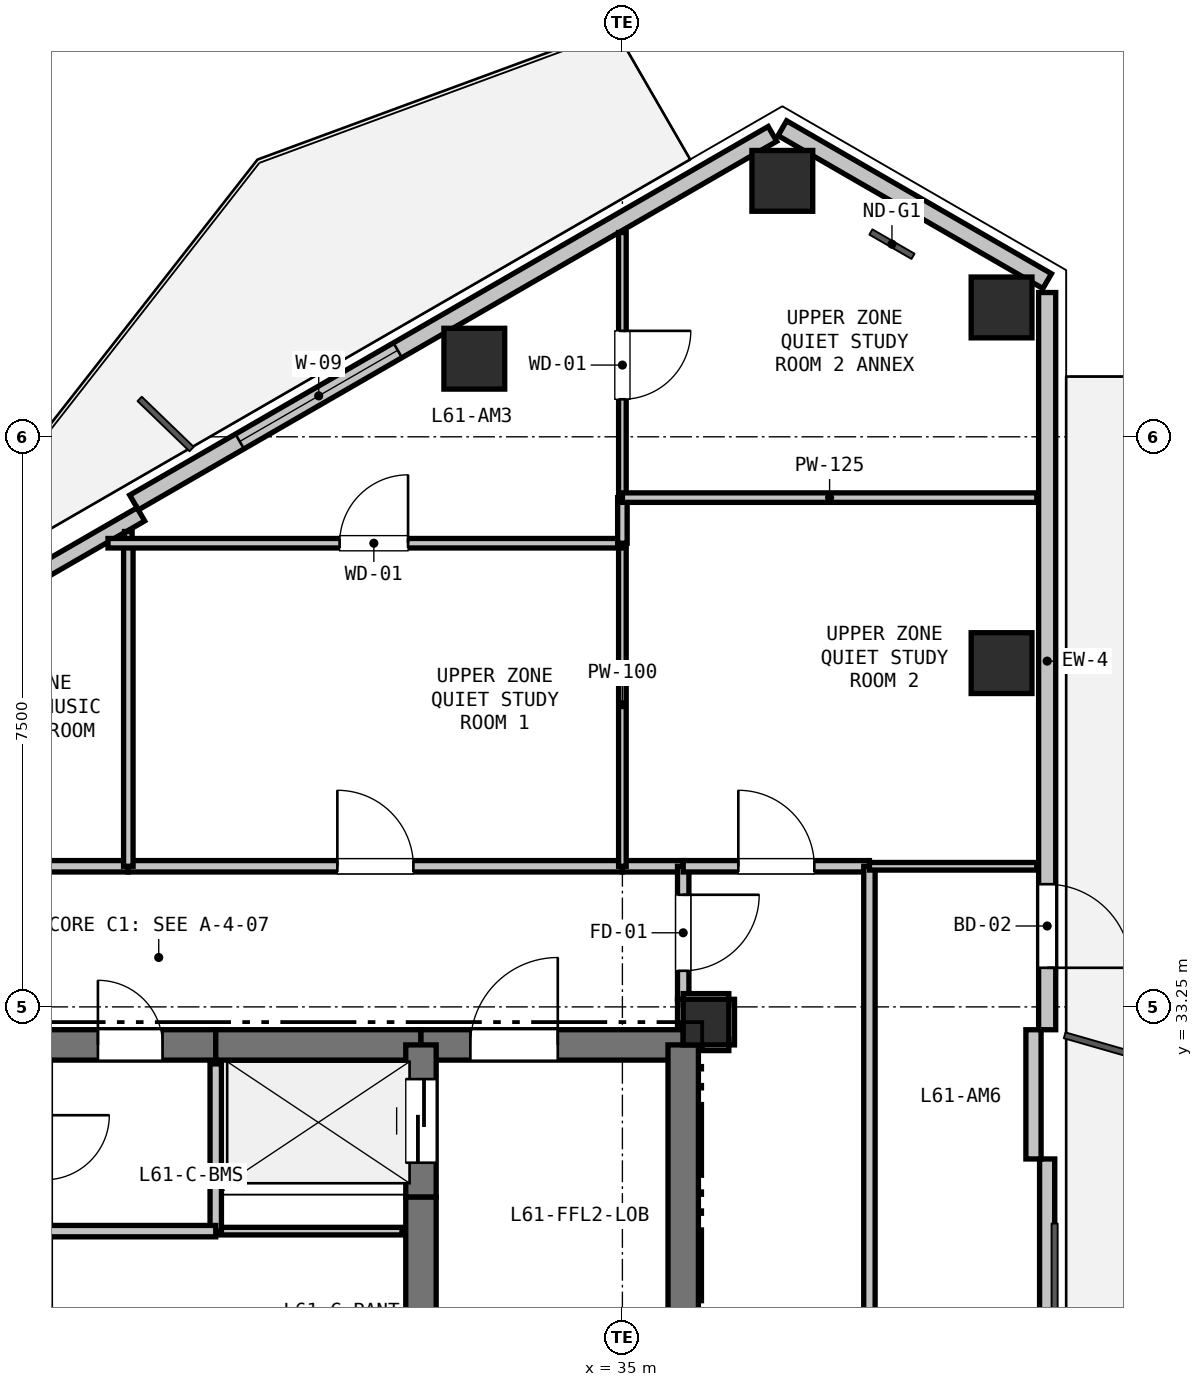
"""IFC4 building model, lengths in metres.
Left out: names, types, materials, properties, quantities, classifications, styles, units other than length and angle.
Written with IfcOpenShell. Run it as: python <this file> out.ifc"""

import sys

from ifc_helpers import new_model, si_unit, direction, frame, frame_2d, origin, origin_2d, place, context, subcontext, project, spatial, rectangle, hollow_rectangle, extrude, element, fill, save


model = new_model("IFC4")
c1 = context("Model", 3, precision=1e-05, world=origin(), true_north=direction((0.0, 1.0)))
c2 = subcontext(c1, "Body", "Model", "MODEL_VIEW")
j1 = project(units=[si_unit("LENGTHUNIT", "METRE"), si_unit("PLANEANGLEUNIT", "RADIAN")], contexts=[c1])
p1 = place(None, origin())
s1 = spatial("IfcSite", under=j1, at=p1, CompositionType="ELEMENT")
p2 = place(p1, origin())
s2 = spatial("IfcBuilding", under=s1, at=p2, CompositionType="ELEMENT")
p3 = place(p2, frame((0.0, 0.0, 218.4)))
s3 = spatial("IfcBuildingStorey", under=s2, at=p3, CompositionType="ELEMENT", Elevation=218.4)
p4 = place(p3, frame((36.1, 33.05, 0.0), z_axis=(0.0, 0.0, 1.0), x_axis=(1.0, 0.0, 0.0)))
e1 = element("IfcColumn", 1, at=p4, inside=s3, PredefinedType="COLUMN", context=c2, shape_type="SweptSolid", body=[
    extrude(rectangle(XDim=0.6, YDim=0.6, at=origin_2d()), origin(), (0.0, 0.0, 1.0), 4.8),
])
for number, where, z_axis, x_axis in (
    (2, (33.052, 41.778, 0.0), (0.0, 0.0, 1.0), (1.0, 0.0, 0.0)),
    (3, (37.104, 44.117, 0.0), (0.0, 0.0, 1.0), (1.0, 0.0, 0.0)),
    (4, (39.988, 42.452, 0.0), (0.0, 0.0, 1.0), (1.0, 0.0, 0.0)),
    (5, (39.988, 37.773, 0.0), (0.0, 0.0, 1.0), (1.0, 0.0, 0.0)),
):
    element("IfcColumn", number, at=place(p3, frame(where, z_axis=z_axis, x_axis=x_axis)), inside=s3, PredefinedType="COLUMN", context=c2, shape_type="SweptSolid", body=[
        extrude(hollow_rectangle(XDim=0.8, YDim=0.8, WallThickness=0.025, at=origin_2d()), origin(), (0.0, 0.0, 1.0), 3.23),
    ])
p5 = place(p3, frame((37.104, 44.81, 0.0), z_axis=(0.0, 0.0, 1.0), x_axis=(0.866023907196, -0.500002592159, 0.0)))
e6 = element("IfcWall", 6, at=p5, inside=s3, PredefinedType="SOLIDWALL", context=c2, shape_type="SweptSolid", body=[
    extrude(rectangle(XDim=4.023, YDim=0.225, at=frame_2d((2.012, 0.0))), origin(), (0.0, 0.0, 1.0), 4.2),
])
p6 = place(p3, frame((28.575, 39.885, 0.0), z_axis=(0.0, 0.0, 1.0), x_axis=(0.866016233231, 0.500015883528, 0.0)))
e7 = element("IfcWall", 7, at=p6, inside=s3, PredefinedType="SOLIDWALL", context=c2, shape_type="SweptSolid", body=[
    extrude(rectangle(XDim=9.699, YDim=0.225, at=frame_2d((4.85, 0.0))), origin(), (0.0, 0.0, 1.0), 3.215),
])
p7 = place(p6, frame((1.606, 0.0, 0.9)))
e8 = element("IfcOpeningElement", 8, at=p7, cuts=e7, PredefinedType="OPENING", context=c2, shape_type="SweptSolid", body=[
    extrude(rectangle(XDim=2.4, YDim=2.2, at=frame_2d((1.2, 1.1))), frame((0.0, 0.123, 0.0), z_axis=(0.0, -1.0, 0.0), x_axis=(1.0, 0.0, 0.0)), (0.0, 0.0, 1.0), 0.245),
])
p8 = place(p3, frame((27.192, 38.88, 0.0), z_axis=(0.0, 0.0, 1.0), x_axis=(0.866025371046, 0.500000056704, 0.0)))
e9 = element("IfcWall", 9, at=p8, inside=s3, PredefinedType="PARAPET", context=c2, shape_type="SweptSolid", body=[
    extrude(rectangle(XDim=1.7, YDim=0.2, at=frame_2d((0.85, 0.0))), origin(), (0.0, 0.0, 1.0), 4.2),
])
p9 = place(p3, frame((40.588, 42.648, 0.0), z_axis=(0.0, 0.0, 1.0), x_axis=(0.0, -1.0, 0.0)))
e10 = element("IfcWall", 10, at=p9, inside=s3, PredefinedType="SOLIDWALL", context=c2, shape_type="SweptSolid", body=[
    extrude(rectangle(XDim=9.699, YDim=0.225, at=frame_2d((4.85, 0.0))), origin(), (0.0, 0.0, 1.0), 3.215),
])
p10 = place(p9, frame((7.784, 0.0, 0.0)))
e11 = element("IfcOpeningElement", 11, at=p10, cuts=e10, PredefinedType="OPENING", context=c2, shape_type="SweptSolid", body=[
    extrude(rectangle(XDim=1.1, YDim=2.1, at=frame_2d((0.55, 1.05))), frame((0.0, 0.123, 0.0), z_axis=(0.0, -1.0, 0.0), x_axis=(1.0, 0.0, 0.0)), (0.0, 0.0, 1.0), 0.245),
])
p11 = place(p3, frame((40.588, 31.25, 0.0), z_axis=(0.0, 0.0, 1.0), x_axis=(0.0, -1.0, 0.0)))
e12 = element("IfcWall", 12, at=p11, inside=s3, PredefinedType="PARAPET", context=c2, shape_type="SweptSolid", body=[
    extrude(rectangle(XDim=8.999, YDim=0.2, at=frame_2d((4.5, 0.0))), origin(), (0.0, 0.0, 1.0), 0.2),
])
p12 = place(p3, frame((40.408, 32.949, 0.0), z_axis=(0.0, 0.0, 1.0), x_axis=(0.0, -1.0, 0.0)))
e13 = element("IfcWall", 13, at=p12, inside=s3, PredefinedType="PARAPET", context=c2, shape_type="SweptSolid", body=[
    extrude(rectangle(XDim=1.7, YDim=0.2, at=frame_2d((0.85, 0.0))), origin(), (0.0, 0.0, 1.0), 4.2),
])
p13 = place(p3, frame((27.4, 32.75, 0.0), z_axis=(0.0, 0.0, 1.0), x_axis=(1.0, 0.0, 0.0)))
e14 = element("IfcWall", 14, at=p13, inside=s3, PredefinedType="SHEAR", context=c2, shape_type="SweptSolid", body=[
    extrude(rectangle(XDim=2.25, YDim=0.4, at=frame_2d((1.125, 0.0))), origin(), (0.0, 0.0, 1.0), 4.58),
])
p14 = place(p13, frame((0.7, 0.0, 0.0)))
e15 = element("IfcOpeningElement", 15, at=p14, cuts=e14, PredefinedType="OPENING", context=c2, shape_type="SweptSolid", body=[
    extrude(rectangle(XDim=0.85, YDim=2.1, at=frame_2d((0.425, 1.05))), frame((0.0, 0.21, 0.0), z_axis=(0.0, -1.0, 0.0), x_axis=(1.0, 0.0, 0.0)), (0.0, 0.0, 1.0), 0.42),
])
p15 = place(p3, frame((29.65, 32.75, 0.0), z_axis=(0.0, 0.0, 1.0), x_axis=(1.0, 0.0, 0.0)))
e16 = element("IfcWall", 16, at=p15, inside=s3, PredefinedType="SHEAR", context=c2, shape_type="SweptSolid", body=[
    extrude(rectangle(XDim=2.7, YDim=0.4, at=frame_2d((1.35, 0.0))), origin(), (0.0, 0.0, 1.0), 4.58),
])
p16 = place(p3, frame((32.35, 32.75, 0.0), z_axis=(0.0, 0.0, 1.0), x_axis=(1.0, 0.0, 0.0)))
e17 = element("IfcWall", 17, at=p16, inside=s3, PredefinedType="SHEAR", context=c2, shape_type="SweptSolid", body=[
    extrude(rectangle(XDim=3.45, YDim=0.4, at=frame_2d((1.725, 0.0))), origin(), (0.0, 0.0, 1.0), 4.58),
])
p17 = place(p16, frame((0.65, 0.0, 0.0)))
e18 = element("IfcOpeningElement", 18, at=p17, cuts=e17, PredefinedType="OPENING", context=c2, shape_type="SweptSolid", body=[
    extrude(rectangle(XDim=1.15, YDim=2.15, at=frame_2d((0.575, 1.075))), frame((0.0, 0.21, 0.0), z_axis=(0.0, -1.0, 0.0), x_axis=(1.0, 0.0, 0.0)), (0.0, 0.0, 1.0), 0.42),
])
p18 = place(p3, frame((35.8, 32.75, 0.0), z_axis=(0.0, 0.0, 1.0), x_axis=(0.0, -1.0, 0.0)))
e19 = element("IfcWall", 19, at=p18, inside=s3, PredefinedType="SHEAR", context=c2, shape_type="SweptSolid", body=[
    extrude(rectangle(XDim=4.65, YDim=0.4, at=frame_2d((2.325, 0.0))), origin(), (0.0, 0.0, 1.0), 4.58),
])
p19 = place(p3, frame((32.35, 27.95, 0.0), z_axis=(0.0, 0.0, 1.0), x_axis=(0.0, 1.0, 0.0)))
e20 = element("IfcWall", 20, at=p19, inside=s3, PredefinedType="SHEAR", context=c2, shape_type="SweptSolid", body=[
    extrude(rectangle(XDim=2.8, YDim=0.4, at=frame_2d((1.4, 0.0))), origin(), (0.0, 0.0, 1.0), 4.58),
])
p20 = place(p3, frame((32.35, 30.75, 0.0), z_axis=(0.0, 0.0, 1.0), x_axis=(0.0, 1.0, 0.0)))
e21 = element("IfcWall", 21, at=p20, inside=s3, PredefinedType="SHEAR", context=c2, shape_type="SweptSolid", body=[
    extrude(rectangle(XDim=2.0, YDim=0.4, at=frame_2d((1.0, 0.0))), origin(), (0.0, 0.0, 1.0), 4.58),
])
p21 = place(p20, frame((0.45, 0.0, 0.0)))
e22 = element("IfcOpeningElement", 22, at=p21, cuts=e21, PredefinedType="OPENING", context=c2, shape_type="SweptSolid", body=[
    extrude(rectangle(XDim=1.1, YDim=2.15, at=frame_2d((0.55, 1.075))), frame((0.0, 0.21, 0.0), z_axis=(0.0, -1.0, 0.0), x_axis=(1.0, 0.0, 0.0)), (0.0, 0.0, 1.0), 0.42),
])
p22 = place(p3, frame((32.1, 30.3, 0.0), z_axis=(0.0, 0.0, 1.0), x_axis=(-1.0, 0.0, 0.0)))
e23 = element("IfcWall", 23, at=p22, inside=s3, PredefinedType="PARTITIONING", context=c2, shape_type="SweptSolid", body=[
    extrude(rectangle(XDim=2.45, YDim=0.1, at=frame_2d((1.225, 0.0))), origin(), (0.0, 0.0, 1.0), 4.58),
])
p23 = place(p3, frame((29.65, 30.3, 0.0), z_axis=(0.0, 0.0, 1.0), x_axis=(0.0, 1.0, 0.0)))
e24 = element("IfcWall", 24, at=p23, inside=s3, PredefinedType="PARTITIONING", context=c2, shape_type="SweptSolid", body=[
    extrude(rectangle(XDim=2.2, YDim=0.15, at=frame_2d((1.1, 0.0))), origin(), (0.0, 0.0, 1.0), 4.58),
])
p24 = place(p3, frame((20.362, 35.1, 0.0), z_axis=(0.0, 0.0, 1.0), x_axis=(1.0, 0.0, 0.0)))
e25 = element("IfcWall", 25, at=p24, inside=s3, PredefinedType="PARTITIONING", context=c2, shape_type="SweptSolid", body=[
    extrude(rectangle(XDim=8.138, YDim=0.15, at=frame_2d((4.069, 0.0))), origin(), (0.0, 0.0, 1.0), 2.365),
])
p25 = place(p24, frame((3.169, 0.0, 0.0)))
e26 = element("IfcOpeningElement", 26, at=p25, cuts=e25, PredefinedType="OPENING", context=c2, shape_type="SweptSolid", body=[
    extrude(rectangle(XDim=1.8, YDim=2.2, at=frame_2d((0.9, 1.1))), frame((0.0, 0.085, 0.0), z_axis=(0.0, -1.0, 0.0), x_axis=(1.0, 0.0, 0.0)), (0.0, 0.0, 1.0), 0.17),
])
p26 = place(p3, frame((28.5, 35.1, 0.0), z_axis=(0.0, 0.0, 1.0), x_axis=(1.0, 0.0, 0.0)))
e27 = element("IfcWall", 27, at=p26, inside=s3, PredefinedType="PARTITIONING", context=c2, shape_type="SweptSolid", body=[
    extrude(rectangle(XDim=6.5, YDim=0.15, at=frame_2d((3.25, 0.0))), origin(), (0.0, 0.0, 1.0), 3.215),
])
p27 = place(p26, frame((2.75, 0.0, 0.0)))
e28 = element("IfcOpeningElement", 28, at=p27, cuts=e27, PredefinedType="OPENING", context=c2, shape_type="SweptSolid", body=[
    extrude(rectangle(XDim=1.0, YDim=2.15, at=frame_2d((0.5, 1.075))), frame((0.0, 0.085, 0.0), z_axis=(0.0, -1.0, 0.0), x_axis=(1.0, 0.0, 0.0)), (0.0, 0.0, 1.0), 0.17),
])
p28 = place(p3, frame((35.0, 35.1, 0.0), z_axis=(0.0, 0.0, 1.0), x_axis=(1.0, 0.0, 0.0)))
e29 = element("IfcWall", 29, at=p28, inside=s3, PredefinedType="PARTITIONING", context=c2, shape_type="SweptSolid", body=[
    extrude(rectangle(XDim=0.8, YDim=0.15, at=frame_2d((0.4, 0.0))), origin(), (0.0, 0.0, 1.0), 3.215),
])
p29 = place(p3, frame((35.8, 35.1, 0.0), z_axis=(0.0, 0.0, 1.0), x_axis=(0.0, -1.0, 0.0)))
e30 = element("IfcWall", 30, at=p29, inside=s3, PredefinedType="PARTITIONING", context=c2, shape_type="SweptSolid", body=[
    extrude(rectangle(XDim=1.75, YDim=0.15, at=frame_2d((0.875, 0.0))), origin(), (0.0, 0.0, 1.0), 3.215),
])
p30 = place(p29, frame((0.375, 0.0, 0.0)))
e31 = element("IfcOpeningElement", 31, at=p30, cuts=e30, PredefinedType="OPENING", context=c2, shape_type="SweptSolid", body=[
    extrude(rectangle(XDim=1.0, YDim=2.15, at=frame_2d((0.5, 1.075))), frame((0.0, 0.085, 0.0), z_axis=(0.0, -1.0, 0.0), x_axis=(1.0, 0.0, 0.0)), (0.0, 0.0, 1.0), 0.17),
])
p31 = place(p3, frame((35.8, 33.35, 0.0), z_axis=(0.0, 0.0, 1.0), x_axis=(0.0, -1.0, 0.0)))
e32 = element("IfcWall", 32, at=p31, inside=s3, PredefinedType="PARTITIONING", context=c2, shape_type="SweptSolid", body=[
    extrude(rectangle(XDim=0.35, YDim=0.15, at=frame_2d((0.175, 0.0))), origin(), (0.0, 0.0, 1.0), 3.215),
])
p32 = place(p3, frame((36.4, 32.75, 0.0), z_axis=(0.0, 0.0, 1.0), x_axis=(0.0, 1.0, 0.0)))
e33 = element("IfcWall", 33, at=p32, inside=s3, PredefinedType="PARTITIONING", context=c2, shape_type="SweptSolid", body=[
    extrude(rectangle(XDim=0.6, YDim=0.15, at=frame_2d((0.3, 0.0))), origin(), (0.0, 0.0, 1.0), 3.215),
])
p33 = place(p3, frame((36.4, 33.35, 0.0), z_axis=(0.0, 0.0, 1.0), x_axis=(-1.0, 0.0, 0.0)))
e34 = element("IfcWall", 34, at=p33, inside=s3, PredefinedType="PARTITIONING", context=c2, shape_type="SweptSolid", body=[
    extrude(rectangle(XDim=0.6, YDim=0.15, at=frame_2d((0.3, 0.0))), origin(), (0.0, 0.0, 1.0), 3.215),
])
p34 = place(p3, frame((35.8, 35.1, 0.0), z_axis=(0.0, 0.0, 1.0), x_axis=(1.0, 0.0, 0.0)))
e35 = element("IfcWall", 35, at=p34, inside=s3, PredefinedType="PARTITIONING", context=c2, shape_type="SweptSolid", body=[
    extrude(rectangle(XDim=2.45, YDim=0.15, at=frame_2d((1.225, 0.0))), origin(), (0.0, 0.0, 1.0), 3.215),
])
p35 = place(p34, frame((0.725, 0.0, 0.0)))
e36 = element("IfcOpeningElement", 36, at=p35, cuts=e35, PredefinedType="OPENING", context=c2, shape_type="SweptSolid", body=[
    extrude(rectangle(XDim=1.0, YDim=2.15, at=frame_2d((0.5, 1.075))), frame((0.0, 0.085, 0.0), z_axis=(0.0, -1.0, 0.0), x_axis=(1.0, 0.0, 0.0)), (0.0, 0.0, 1.0), 0.17),
])
p36 = place(p3, frame((38.25, 35.1, 0.0), z_axis=(0.0, 0.0, 1.0), x_axis=(0.0, -1.0, 0.0)))
e37 = element("IfcWall", 37, at=p36, inside=s3, PredefinedType="PARTITIONING", context=c2, shape_type="SweptSolid", body=[
    extrude(rectangle(XDim=16.7, YDim=0.15, at=frame_2d((8.35, 0.0))), origin(), (0.0, 0.0, 1.0), 3.215),
])
p37 = place(p36, frame((7.85, 0.0, 0.0)))
e38 = element("IfcOpeningElement", 38, at=p37, cuts=e37, PredefinedType="OPENING", context=c2, shape_type="SweptSolid", body=[
    extrude(rectangle(XDim=1.0, YDim=2.15, at=frame_2d((0.5, 1.075))), frame((0.0, 0.085, 0.0), z_axis=(0.0, -1.0, 0.0), x_axis=(1.0, 0.0, 0.0)), (0.0, 0.0, 1.0), 0.17),
])
p38 = place(p3, frame((36.05, 32.75, 0.0), z_axis=(0.0, 0.0, 1.0), x_axis=(1.0, 0.0, 0.0)))
e39 = element("IfcWall", 39, at=p38, inside=s3, PredefinedType="PARTITIONING", context=c2, shape_type="SweptSolid", body=[
    extrude(rectangle(XDim=0.35, YDim=0.15, at=frame_2d((0.175, 0.0))), origin(), (0.0, 0.0, 1.0), 4.105),
])
p39 = place(p3, frame((27.4, 30.3, 0.0), z_axis=(0.0, 0.0, 1.0), x_axis=(1.0, 0.0, 0.0)))
e40 = element("IfcWall", 40, at=p39, inside=s3, PredefinedType="PARTITIONING", context=c2, shape_type="SweptSolid", body=[
    extrude(rectangle(XDim=2.25, YDim=0.15, at=frame_2d((1.125, 0.0))), origin(), (0.0, 0.0, 1.0), 4.58),
])
p40 = place(p3, frame((28.5, 39.504, 0.0), z_axis=(0.0, 0.0, 1.0), x_axis=(0.0, -1.0, 0.0)))
e41 = element("IfcWall", 41, at=p40, inside=s3, PredefinedType="PARTITIONING", context=c2, shape_type="SweptSolid", body=[
    extrude(rectangle(XDim=0.154, YDim=0.1, at=frame_2d((0.077, 0.0))), origin(), (0.0, 0.0, 1.0), 4.58),
])
p41 = place(p3, frame((28.5, 39.35, 0.0), z_axis=(0.0, 0.0, 1.0), x_axis=(0.0, -1.0, 0.0)))
e42 = element("IfcWall", 42, at=p41, inside=s3, PredefinedType="PARTITIONING", context=c2, shape_type="SweptSolid", body=[
    extrude(rectangle(XDim=4.25, YDim=0.125, at=frame_2d((2.125, 0.0))), origin(), (0.0, 0.0, 1.0), 2.365),
])
p42 = place(p3, frame((35.0, 39.35, 0.0), z_axis=(0.0, 0.0, 1.0), x_axis=(0.0, -1.0, 0.0)))
e43 = element("IfcWall", 43, at=p42, inside=s3, PredefinedType="PARTITIONING", context=c2, shape_type="SweptSolid", body=[
    extrude(rectangle(XDim=4.25, YDim=0.1, at=frame_2d((2.125, 0.0))), origin(), (0.0, 0.0, 1.0), 3.215),
])
p43 = place(p3, frame((28.232, 39.35, 0.0), z_axis=(0.0, 0.0, 1.0), x_axis=(1.0, 0.0, 0.0)))
e44 = element("IfcWall", 44, at=p43, inside=s3, PredefinedType="PARTITIONING", context=c2, shape_type="SweptSolid", body=[
    extrude(rectangle(XDim=6.768, YDim=0.125, at=frame_2d((3.384, 0.0))), origin(), (0.0, 0.0, 1.0), 2.365),
])
p44 = place(p43, frame((3.048, 0.0, 0.0)))
e45 = element("IfcOpeningElement", 45, at=p44, cuts=e44, PredefinedType="OPENING", context=c2, shape_type="SweptSolid", body=[
    extrude(rectangle(XDim=0.9, YDim=2.1, at=frame_2d((0.45, 1.05))), frame((0.0, 0.073, 0.0), z_axis=(0.0, -1.0, 0.0), x_axis=(1.0, 0.0, 0.0)), (0.0, 0.0, 1.0), 0.145),
])
p45 = place(p3, frame((35.0, 43.438, 0.0), z_axis=(0.0, 0.0, 1.0), x_axis=(0.0, -1.0, 0.0)))
e46 = element("IfcWall", 46, at=p45, inside=s3, PredefinedType="PARTITIONING", context=c2, shape_type="SweptSolid", body=[
    extrude(rectangle(XDim=3.488, YDim=0.1, at=frame_2d((1.744, 0.0))), origin(), (0.0, 0.0, 1.0), 3.215),
])
p46 = place(p45, frame((1.294, 0.0, 0.0)))
e47 = element("IfcOpeningElement", 47, at=p46, cuts=e46, PredefinedType="OPENING", context=c2, shape_type="SweptSolid", body=[
    extrude(rectangle(XDim=0.9, YDim=2.1, at=frame_2d((0.45, 1.05))), frame((0.0, 0.06, 0.0), z_axis=(0.0, -1.0, 0.0), x_axis=(1.0, 0.0, 0.0)), (0.0, 0.0, 1.0), 0.12),
])
p47 = place(p3, frame((35.0, 39.95, 0.0), z_axis=(0.0, 0.0, 1.0), x_axis=(0.0, -1.0, 0.0)))
e48 = element("IfcWall", 48, at=p47, inside=s3, PredefinedType="PARTITIONING", context=c2, shape_type="SweptSolid", body=[
    extrude(rectangle(XDim=0.6, YDim=0.125, at=frame_2d((0.3, 0.0))), origin(), (0.0, 0.0, 1.0), 3.215),
])
p48 = place(p3, frame((40.452, 35.1, 0.0), z_axis=(0.0, 0.0, 1.0), x_axis=(-1.0, 0.0, 0.0)))
e49 = element("IfcWall", 49, at=p48, inside=s3, PredefinedType="PARTITIONING", context=c2, shape_type="SweptSolid", body=[
    extrude(rectangle(XDim=2.202, YDim=0.1, at=frame_2d((1.101, 0.0))), origin(), (0.0, 0.0, 1.0), 2.365),
])
p49 = place(p3, frame((35.0, 39.95, 0.0), z_axis=(0.0, 0.0, 1.0), x_axis=(1.0, 0.0, 0.0)))
e50 = element("IfcWall", 50, at=p49, inside=s3, PredefinedType="PARTITIONING", context=c2, shape_type="SweptSolid", body=[
    extrude(rectangle(XDim=5.452, YDim=0.125, at=frame_2d((2.726, 0.0))), origin(), (0.0, 0.0, 1.0), 3.215),
])
p50 = place(p7, origin())
e51 = element("IfcWindow", 51, at=p50, inside=s3, PartitioningType="SINGLE_PANEL", PredefinedType="WINDOW", context=c2, shape_type="SweptSolid", body=[
    extrude(rectangle(XDim=2.4, YDim=2.2, at=frame_2d((1.2, 1.1))), frame((0.0, 0.03, 0.0), z_axis=(0.0, -1.0, 0.0), x_axis=(1.0, 0.0, 0.0)), (0.0, 0.0, 1.0), 0.06),
])
fill(e8, e51)
p51 = place(p10, origin())
e52 = element("IfcDoor", 52, at=p51, inside=s3, OperationType="SINGLE_SWING_RIGHT", PredefinedType="DOOR", context=c2, shape_type="SweptSolid", body=[
    extrude(rectangle(XDim=1.1, YDim=2.1, at=frame_2d((0.55, 1.05))), frame((0.0, 0.025, 0.0), z_axis=(0.0, -1.0, 0.0), x_axis=(1.0, 0.0, 0.0)), (0.0, 0.0, 1.0), 0.05),
])
fill(e11, e52)
p52 = place(p21, origin())
e53 = element("IfcDoor", 53, at=p52, inside=s3, OperationType="SLIDING_TO_LEFT", PredefinedType="DOOR", context=c2, shape_type="SweptSolid", body=[
    extrude(rectangle(XDim=1.1, YDim=2.15, at=frame_2d((0.55, 1.075))), frame((0.0, 0.025, 0.0), z_axis=(0.0, -1.0, 0.0), x_axis=(1.0, 0.0, 0.0)), (0.0, 0.0, 1.0), 0.05),
])
fill(e22, e53)
p53 = place(p17, origin())
e54 = element("IfcDoor", 54, at=p53, inside=s3, OperationType="SINGLE_SWING_RIGHT", PredefinedType="DOOR", context=c2, shape_type="SweptSolid", body=[
    extrude(rectangle(XDim=1.15, YDim=2.15, at=frame_2d((0.575, 1.075))), frame((0.0, 0.025, 0.0), z_axis=(0.0, -1.0, 0.0), x_axis=(1.0, 0.0, 0.0)), (0.0, 0.0, 1.0), 0.05),
])
fill(e18, e54)
p54 = place(p30, origin())
e55 = element("IfcDoor", 55, at=p54, inside=s3, OperationType="SINGLE_SWING_LEFT", PredefinedType="DOOR", context=c2, shape_type="SweptSolid", body=[
    extrude(rectangle(XDim=1.0, YDim=2.15, at=frame_2d((0.5, 1.075))), frame((0.0, 0.025, 0.0), z_axis=(0.0, -1.0, 0.0), x_axis=(1.0, 0.0, 0.0)), (0.0, 0.0, 1.0), 0.05),
])
fill(e31, e55)
p55 = place(p14, origin())
e56 = element("IfcDoor", 56, at=p55, inside=s3, OperationType="SINGLE_SWING_LEFT", PredefinedType="DOOR", context=c2, shape_type="SweptSolid", body=[
    extrude(rectangle(XDim=0.85, YDim=2.1, at=frame_2d((0.425, 1.05))), frame((0.0, 0.025, 0.0), z_axis=(0.0, -1.0, 0.0), x_axis=(1.0, 0.0, 0.0)), (0.0, 0.0, 1.0), 0.05),
])
fill(e15, e56)
p56 = place(p27, origin())
e57 = element("IfcDoor", 57, at=p56, inside=s3, OperationType="SINGLE_SWING_LEFT", PredefinedType="DOOR", context=c2, shape_type="SweptSolid", body=[
    extrude(rectangle(XDim=1.0, YDim=2.15, at=frame_2d((0.5, 1.075))), frame((0.0, 0.025, 0.0), z_axis=(0.0, -1.0, 0.0), x_axis=(1.0, 0.0, 0.0)), (0.0, 0.0, 1.0), 0.05),
])
fill(e28, e57)
p57 = place(p35, origin())
e58 = element("IfcDoor", 58, at=p57, inside=s3, OperationType="SINGLE_SWING_LEFT", PredefinedType="DOOR", context=c2, shape_type="SweptSolid", body=[
    extrude(rectangle(XDim=1.0, YDim=2.15, at=frame_2d((0.5, 1.075))), frame((0.0, 0.025, 0.0), z_axis=(0.0, -1.0, 0.0), x_axis=(1.0, 0.0, 0.0)), (0.0, 0.0, 1.0), 0.05),
])
fill(e36, e58)
p58 = place(p44, origin())
e59 = element("IfcDoor", 59, at=p58, inside=s3, OperationType="SINGLE_SWING_RIGHT", PredefinedType="DOOR", context=c2, shape_type="SweptSolid", body=[
    extrude(rectangle(XDim=0.9, YDim=2.1, at=frame_2d((0.45, 1.05))), frame((0.0, 0.025, 0.0), z_axis=(0.0, -1.0, 0.0), x_axis=(1.0, 0.0, 0.0)), (0.0, 0.0, 1.0), 0.05),
])
fill(e45, e59)
p59 = place(p46, origin())
e60 = element("IfcDoor", 60, at=p59, inside=s3, OperationType="SINGLE_SWING_LEFT", PredefinedType="DOOR", context=c2, shape_type="SweptSolid", body=[
    extrude(rectangle(XDim=0.9, YDim=2.1, at=frame_2d((0.45, 1.05))), frame((0.0, 0.025, 0.0), z_axis=(0.0, -1.0, 0.0), x_axis=(1.0, 0.0, 0.0)), (0.0, 0.0, 1.0), 0.05),
])
fill(e47, e60)
save(model, sys.argv[1])
